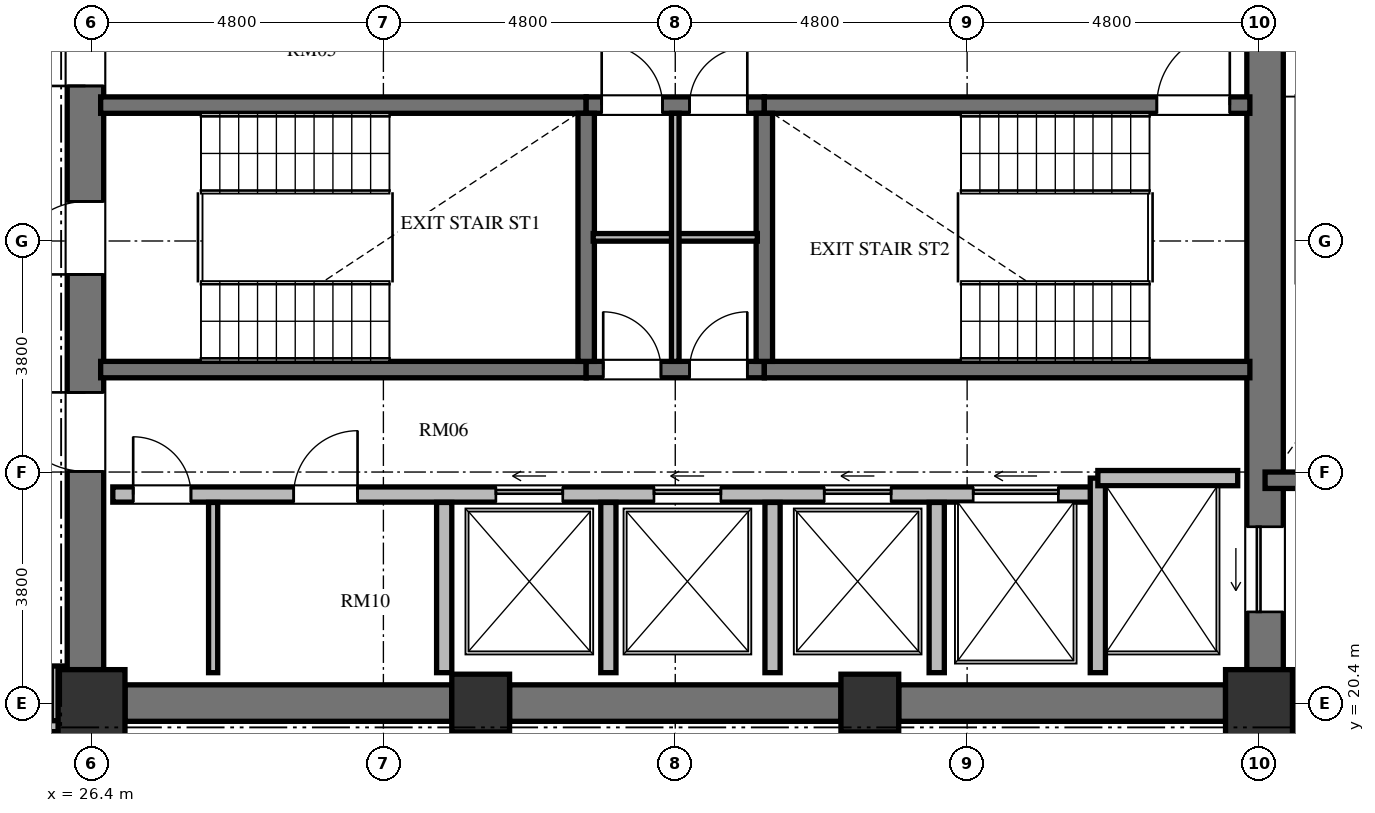
"""IFC4 building model, lengths in metres.
Left out: names, types, materials, properties, quantities, classifications, styles, units other than length and angle.
Written with IfcOpenShell. Run it as: python <this file> out.ifc"""

import sys

from ifc_helpers import new_model, si_unit, direction, frame, frame_2d, origin, origin_2d, place, context, subcontext, project, spatial, rectangle, extrude, element, fill, save


model = new_model("IFC4")
c1 = context("Model", 3, precision=1e-05, world=origin(), true_north=direction((0.0, 1.0)))
c2 = subcontext(c1, "Body", "Model", "MODEL_VIEW")
j1 = project(units=[si_unit("LENGTHUNIT", "METRE"), si_unit("PLANEANGLEUNIT", "RADIAN")], contexts=[c1])
p1 = place(None, origin())
s1 = spatial("IfcSite", under=j1, at=p1, CompositionType="ELEMENT")
p2 = place(p1, origin())
s2 = spatial("IfcBuilding", under=s1, at=p2, CompositionType="ELEMENT")
p3 = place(p2, frame((0.0, 0.0, 160.176)))
s3 = spatial("IfcBuildingStorey", under=s2, at=p3, CompositionType="ELEMENT", Elevation=160.176)
p4 = place(p3, frame((26.4, 20.4, 0.0), z_axis=(0.0, 0.0, 1.0), x_axis=(1.0, 0.0, 0.0)))
e1 = element("IfcColumn", 1, at=p4, inside=s3, PredefinedType="COLUMN", context=c2, shape_type="SweptSolid", body=[
    extrude(rectangle(XDim=1.1, YDim=1.1, at=origin_2d()), origin(), (0.0, 0.0, 1.0), 3.648),
])
for number, where, z_axis, x_axis in (
    (2, (32.8, 20.4, 0.0), (0.0, 0.0, 1.0), (1.0, 0.0, 0.0)),
    (3, (39.2, 20.4, 0.0), (0.0, 0.0, 1.0), (1.0, 0.0, 0.0)),
):
    element("IfcColumn", number, at=place(p3, frame(where, z_axis=z_axis, x_axis=x_axis)), inside=s3, PredefinedType="COLUMN", context=c2, shape_type="SweptSolid", body=[
        extrude(rectangle(XDim=0.95, YDim=0.95, at=origin_2d()), origin(), (0.0, 0.0, 1.0), 3.648),
    ])
p5 = place(p3, frame((45.6, 20.4, 0.0), z_axis=(0.0, 0.0, 1.0), x_axis=(1.0, 0.0, 0.0)))
e4 = element("IfcColumn", 4, at=p5, inside=s3, PredefinedType="COLUMN", context=c2, shape_type="SweptSolid", body=[
    extrude(rectangle(XDim=1.1, YDim=1.1, at=origin_2d()), origin(), (0.0, 0.0, 1.0), 3.648),
])
p6 = place(p3, frame((26.3, 20.95, 0.0), z_axis=(0.0, 0.0, 1.0), x_axis=(0.0, 1.0, 0.0)))
e5 = element("IfcWall", 5, at=p6, inside=s3, PredefinedType="SHEAR", context=c2, shape_type="SweptSolid", body=[
    extrude(rectangle(XDim=14.1, YDim=0.6, at=frame_2d((7.05, 0.0))), origin(), (0.0, 0.0, 1.0), 3.648),
])
p7 = place(p6, frame((6.5, 0.0, 0.0)))
e6 = element("IfcOpeningElement", 6, at=p7, cuts=e5, PredefinedType="OPENING", context=c2, shape_type="SweptSolid", body=[
    extrude(rectangle(XDim=1.2, YDim=2.15, at=frame_2d((0.6, 1.075))), frame((0.0, 0.31, 0.0), z_axis=(0.0, -1.0, 0.0), x_axis=(1.0, 0.0, 0.0)), (0.0, 0.0, 1.0), 0.62),
])
p8 = place(p6, frame((9.6, 0.0, 0.0)))
e7 = element("IfcOpeningElement", 7, at=p8, cuts=e5, PredefinedType="OPENING", context=c2, shape_type="SweptSolid", body=[
    extrude(rectangle(XDim=1.3, YDim=2.2, at=frame_2d((0.65, 1.1))), frame((0.0, 0.31, 0.0), z_axis=(0.0, -1.0, 0.0), x_axis=(1.0, 0.0, 0.0)), (0.0, 0.0, 1.0), 0.62),
])
p9 = place(p6, frame((3.26, 0.0, 0.0)))
e8 = element("IfcOpeningElement", 8, at=p9, cuts=e5, PredefinedType="OPENING", context=c2, shape_type="SweptSolid", body=[
    extrude(rectangle(XDim=1.3, YDim=2.2, at=frame_2d((0.65, 1.1))), frame((0.0, 0.31, 0.0), z_axis=(0.0, -1.0, 0.0), x_axis=(1.0, 0.0, 0.0)), (0.0, 0.0, 1.0), 0.62),
])
p10 = place(p3, frame((45.7, 20.95, 0.0), z_axis=(0.0, 0.0, 1.0), x_axis=(0.0, 1.0, 0.0)))
e9 = element("IfcWall", 9, at=p10, inside=s3, PredefinedType="SHEAR", context=c2, shape_type="SweptSolid", body=[
    extrude(rectangle(XDim=14.1, YDim=0.6, at=frame_2d((7.05, 0.0))), origin(), (0.0, 0.0, 1.0), 3.648),
])
p11 = place(p10, frame((11.75, 0.0, 0.0)))
e10 = element("IfcOpeningElement", 10, at=p11, cuts=e9, PredefinedType="OPENING", context=c2, shape_type="SweptSolid", body=[
    extrude(rectangle(XDim=1.4, YDim=2.3, at=frame_2d((0.7, 1.15))), frame((0.0, 0.31, 0.0), z_axis=(0.0, -1.0, 0.0), x_axis=(1.0, 0.0, 0.0)), (0.0, 0.0, 1.0), 0.62),
])
p12 = place(p10, frame((0.95, 0.0, 0.0)))
e11 = element("IfcOpeningElement", 11, at=p12, cuts=e9, PredefinedType="OPENING", context=c2, shape_type="SweptSolid", body=[
    extrude(rectangle(XDim=1.4, YDim=2.3, at=frame_2d((0.7, 1.15))), frame((0.0, 0.31, 0.0), z_axis=(0.0, -1.0, 0.0), x_axis=(1.0, 0.0, 0.0)), (0.0, 0.0, 1.0), 0.62),
])
p13 = place(p3, frame((26.95, 20.4, 0.0), z_axis=(0.0, 0.0, 1.0), x_axis=(1.0, 0.0, 0.0)))
e12 = element("IfcWall", 12, at=p13, inside=s3, PredefinedType="SHEAR", context=c2, shape_type="SweptSolid", body=[
    extrude(rectangle(XDim=5.375, YDim=0.6, at=frame_2d((2.688, 0.0))), origin(), (0.0, 0.0, 1.0), 3.648),
])
p14 = place(p3, frame((33.275, 20.4, 0.0), z_axis=(0.0, 0.0, 1.0), x_axis=(1.0, 0.0, 0.0)))
e13 = element("IfcWall", 13, at=p14, inside=s3, PredefinedType="SHEAR", context=c2, shape_type="SweptSolid", body=[
    extrude(rectangle(XDim=5.45, YDim=0.6, at=frame_2d((2.725, 0.0))), origin(), (0.0, 0.0, 1.0), 3.648),
])
p15 = place(p3, frame((39.675, 20.4, 0.0), z_axis=(0.0, 0.0, 1.0), x_axis=(1.0, 0.0, 0.0)))
e14 = element("IfcWall", 14, at=p15, inside=s3, PredefinedType="SHEAR", context=c2, shape_type="SweptSolid", body=[
    extrude(rectangle(XDim=5.375, YDim=0.6, at=frame_2d((2.688, 0.0))), origin(), (0.0, 0.0, 1.0), 3.648),
])
p16 = place(p3, frame((26.55, 30.235, 0.0), z_axis=(0.0, 0.0, 1.0), x_axis=(1.0, 0.0, 0.0)))
e15 = element("IfcWall", 15, at=p16, inside=s3, PredefinedType="SHEAR", context=c2, shape_type="SweptSolid", body=[
    extrude(rectangle(XDim=7.985, YDim=0.27, at=frame_2d((3.992, 0.0))), origin(), (0.0, 0.0, 1.0), 3.648),
])
p17 = place(p3, frame((34.535, 30.235, 0.0), z_axis=(0.0, 0.0, 1.0), x_axis=(1.0, 0.0, 0.0)))
e16 = element("IfcWall", 16, at=p17, inside=s3, PredefinedType="SHEAR", context=c2, shape_type="SweptSolid", body=[
    extrude(rectangle(XDim=2.93, YDim=0.27, at=frame_2d((1.465, 0.0))), origin(), (0.0, 0.0, 1.0), 3.648),
])
p18 = place(p17, frame((0.255, 0.0, 0.0)))
e17 = element("IfcOpeningElement", 17, at=p18, cuts=e16, PredefinedType="OPENING", context=c2, shape_type="SweptSolid", body=[
    extrude(rectangle(XDim=1.0, YDim=2.1, at=frame_2d((0.5, 1.05))), frame((0.0, 0.145, 0.0), z_axis=(0.0, -1.0, 0.0), x_axis=(1.0, 0.0, 0.0)), (0.0, 0.0, 1.0), 0.29),
])
p19 = place(p17, frame((1.7, 0.0, 0.0)))
e18 = element("IfcOpeningElement", 18, at=p19, cuts=e16, PredefinedType="OPENING", context=c2, shape_type="SweptSolid", body=[
    extrude(rectangle(XDim=0.95, YDim=2.1, at=frame_2d((0.475, 1.05))), frame((0.0, 0.145, 0.0), z_axis=(0.0, -1.0, 0.0), x_axis=(1.0, 0.0, 0.0)), (0.0, 0.0, 1.0), 0.29),
])
p20 = place(p3, frame((37.465, 30.235, 0.0), z_axis=(0.0, 0.0, 1.0), x_axis=(1.0, 0.0, 0.0)))
e19 = element("IfcWall", 19, at=p20, inside=s3, PredefinedType="SHEAR", context=c2, shape_type="SweptSolid", body=[
    extrude(rectangle(XDim=7.985, YDim=0.27, at=frame_2d((3.992, 0.0))), origin(), (0.0, 0.0, 1.0), 3.648),
])
p21 = place(p20, frame((6.455, 0.0, 0.0)))
e20 = element("IfcOpeningElement", 20, at=p21, cuts=e19, PredefinedType="OPENING", context=c2, shape_type="SweptSolid", body=[
    extrude(rectangle(XDim=1.2, YDim=2.15, at=frame_2d((0.6, 1.075))), frame((0.0, 0.145, 0.0), z_axis=(0.0, -1.0, 0.0), x_axis=(1.0, 0.0, 0.0)), (0.0, 0.0, 1.0), 0.29),
])
p22 = place(p3, frame((26.55, 25.885, 0.0), z_axis=(0.0, 0.0, 1.0), x_axis=(1.0, 0.0, 0.0)))
e21 = element("IfcWall", 21, at=p22, inside=s3, PredefinedType="SHEAR", context=c2, shape_type="SweptSolid", body=[
    extrude(rectangle(XDim=7.985, YDim=0.27, at=frame_2d((3.992, 0.0))), origin(), (0.0, 0.0, 1.0), 3.648),
])
p23 = place(p3, frame((34.535, 25.885, 0.0), z_axis=(0.0, 0.0, 1.0), x_axis=(1.0, 0.0, 0.0)))
e22 = element("IfcWall", 22, at=p23, inside=s3, PredefinedType="SHEAR", context=c2, shape_type="SweptSolid", body=[
    extrude(rectangle(XDim=2.93, YDim=0.27, at=frame_2d((1.465, 0.0))), origin(), (0.0, 0.0, 1.0), 3.648),
])
p24 = place(p23, frame((0.28, 0.0, 0.0)))
e23 = element("IfcOpeningElement", 23, at=p24, cuts=e22, PredefinedType="OPENING", context=c2, shape_type="SweptSolid", body=[
    extrude(rectangle(XDim=0.95, YDim=2.1, at=frame_2d((0.475, 1.05))), frame((0.0, 0.145, 0.0), z_axis=(0.0, -1.0, 0.0), x_axis=(1.0, 0.0, 0.0)), (0.0, 0.0, 1.0), 0.29),
])
p25 = place(p23, frame((1.7, 0.0, 0.0)))
e24 = element("IfcOpeningElement", 24, at=p25, cuts=e22, PredefinedType="OPENING", context=c2, shape_type="SweptSolid", body=[
    extrude(rectangle(XDim=0.95, YDim=2.1, at=frame_2d((0.475, 1.05))), frame((0.0, 0.145, 0.0), z_axis=(0.0, -1.0, 0.0), x_axis=(1.0, 0.0, 0.0)), (0.0, 0.0, 1.0), 0.29),
])
p26 = place(p3, frame((37.465, 25.885, 0.0), z_axis=(0.0, 0.0, 1.0), x_axis=(1.0, 0.0, 0.0)))
e25 = element("IfcWall", 25, at=p26, inside=s3, PredefinedType="SHEAR", context=c2, shape_type="SweptSolid", body=[
    extrude(rectangle(XDim=7.985, YDim=0.27, at=frame_2d((3.992, 0.0))), origin(), (0.0, 0.0, 1.0), 3.648),
])
for number, where, z_axis, x_axis in (
    (26, (34.535, 26.02, 0.0), (0.0, 0.0, 1.0), (0.0, 1.0, 0.0)),
    (27, (37.465, 26.02, 0.0), (0.0, 0.0, 1.0), (0.0, 1.0, 0.0)),
):
    element("IfcWall", number, at=place(p3, frame(where, z_axis=z_axis, x_axis=x_axis)), inside=s3, PredefinedType="SHEAR", context=c2, shape_type="SweptSolid", body=[
        extrude(rectangle(XDim=4.08, YDim=0.27, at=frame_2d((2.04, 0.0))), origin(), (0.0, 0.0, 1.0), 3.648),
    ])
p27 = place(p3, frame((34.65, 28.06, 0.0), z_axis=(0.0, 0.0, 1.0), x_axis=(1.0, 0.0, 0.0)))
e28 = element("IfcWall", 28, at=p27, inside=s3, PredefinedType="PARTITIONING", context=c2, shape_type="SweptSolid", body=[
    extrude(rectangle(XDim=2.7, YDim=0.125, at=frame_2d((1.35, 0.0))), origin(), (0.0, 0.0, 1.0), 3.428),
])
p28 = place(p3, frame((36.0, 26.02, 0.0), z_axis=(0.0, 0.0, 1.0), x_axis=(0.0, 1.0, 0.0)))
e29 = element("IfcWall", 29, at=p28, inside=s3, PredefinedType="PARTITIONING", context=c2, shape_type="SweptSolid", body=[
    extrude(rectangle(XDim=4.08, YDim=0.125, at=frame_2d((2.04, 0.0))), origin(), (0.0, 0.0, 1.0), 3.428),
])
p29 = place(p3, frame((26.75, 23.83, 0.0), z_axis=(0.0, 0.0, 1.0), x_axis=(1.0, 0.0, 0.0)))
e30 = element("IfcWall", 30, at=p29, inside=s3, PredefinedType="SOLIDWALL", context=c2, shape_type="SweptSolid", body=[
    extrude(rectangle(XDim=16.2, YDim=0.25, at=frame_2d((8.1, 0.0))), origin(), (0.0, 0.0, 1.0), 3.428),
])
p30 = place(p29, frame((0.335, 0.0, 0.0)))
e31 = element("IfcOpeningElement", 31, at=p30, cuts=e30, PredefinedType="OPENING", context=c2, shape_type="SweptSolid", body=[
    extrude(rectangle(XDim=0.95, YDim=2.1, at=frame_2d((0.475, 1.05))), frame((0.0, 0.135, 0.0), z_axis=(0.0, -1.0, 0.0), x_axis=(1.0, 0.0, 0.0)), (0.0, 0.0, 1.0), 0.27),
])
p31 = place(p29, frame((2.975, 0.0, 0.0)))
e32 = element("IfcOpeningElement", 32, at=p31, cuts=e30, PredefinedType="OPENING", context=c2, shape_type="SweptSolid", body=[
    extrude(rectangle(XDim=1.05, YDim=2.15, at=frame_2d((0.525, 1.075))), frame((0.0, 0.135, 0.0), z_axis=(0.0, -1.0, 0.0), x_axis=(1.0, 0.0, 0.0)), (0.0, 0.0, 1.0), 0.27),
])
p32 = place(p29, frame((6.3, 0.0, 0.0)))
e33 = element("IfcOpeningElement", 33, at=p32, cuts=e30, PredefinedType="OPENING", context=c2, shape_type="SweptSolid", body=[
    extrude(rectangle(XDim=1.1, YDim=2.2, at=frame_2d((0.55, 1.1))), frame((0.0, 0.135, 0.0), z_axis=(0.0, -1.0, 0.0), x_axis=(1.0, 0.0, 0.0)), (0.0, 0.0, 1.0), 0.27),
])
p33 = place(p29, frame((8.9, 0.0, 0.0)))
e34 = element("IfcOpeningElement", 34, at=p33, cuts=e30, PredefinedType="OPENING", context=c2, shape_type="SweptSolid", body=[
    extrude(rectangle(XDim=1.1, YDim=2.2, at=frame_2d((0.55, 1.1))), frame((0.0, 0.135, 0.0), z_axis=(0.0, -1.0, 0.0), x_axis=(1.0, 0.0, 0.0)), (0.0, 0.0, 1.0), 0.27),
])
p34 = place(p29, frame((11.7, 0.0, 0.0)))
e35 = element("IfcOpeningElement", 35, at=p34, cuts=e30, PredefinedType="OPENING", context=c2, shape_type="SweptSolid", body=[
    extrude(rectangle(XDim=1.1, YDim=2.2, at=frame_2d((0.55, 1.1))), frame((0.0, 0.135, 0.0), z_axis=(0.0, -1.0, 0.0), x_axis=(1.0, 0.0, 0.0)), (0.0, 0.0, 1.0), 0.27),
])
p35 = place(p29, frame((14.15, 0.0, 0.0)))
e36 = element("IfcOpeningElement", 36, at=p35, cuts=e30, PredefinedType="OPENING", context=c2, shape_type="SweptSolid", body=[
    extrude(rectangle(XDim=1.4, YDim=2.3, at=frame_2d((0.7, 1.15))), frame((0.0, 0.135, 0.0), z_axis=(0.0, -1.0, 0.0), x_axis=(1.0, 0.0, 0.0)), (0.0, 0.0, 1.0), 0.27),
])
p36 = place(p3, frame((42.95, 20.9, 0.0), z_axis=(0.0, 0.0, 1.0), x_axis=(0.0, 1.0, 0.0)))
e37 = element("IfcWall", 37, at=p36, inside=s3, PredefinedType="SOLIDWALL", context=c2, shape_type="SweptSolid", body=[
    extrude(rectangle(XDim=3.2, YDim=0.25, at=frame_2d((1.6, 0.0))), origin(), (0.0, 0.0, 1.0), 3.428),
])
p37 = place(p3, frame((42.95, 24.1, 0.0), z_axis=(0.0, 0.0, 1.0), x_axis=(1.0, 0.0, 0.0)))
e38 = element("IfcWall", 38, at=p37, inside=s3, PredefinedType="SOLIDWALL", context=c2, shape_type="SweptSolid", body=[
    extrude(rectangle(XDim=2.3, YDim=0.25, at=frame_2d((1.15, 0.0))), origin(), (0.0, 0.0, 1.0), 3.428),
])
for number, where, z_axis, x_axis in (
    (39, (32.2, 20.9, 0.0), (0.0, 0.0, 1.0), (0.0, 1.0, 0.0)),
    (40, (34.9, 20.9, 0.0), (0.0, 0.0, 1.0), (0.0, 1.0, 0.0)),
    (41, (37.6, 20.9, 0.0), (0.0, 0.0, 1.0), (0.0, 1.0, 0.0)),
    (42, (40.3, 20.9, 0.0), (0.0, 0.0, 1.0), (0.0, 1.0, 0.0)),
):
    element("IfcWall", number, at=place(p3, frame(where, z_axis=z_axis, x_axis=x_axis)), inside=s3, PredefinedType="SOLIDWALL", context=c2, shape_type="SweptSolid", body=[
        extrude(rectangle(XDim=2.8, YDim=0.25, at=frame_2d((1.4, 0.0))), origin(), (0.0, 0.0, 1.0), 3.428),
    ])
p38 = place(p3, frame((28.4, 20.9, 0.0), z_axis=(0.0, 0.0, 1.0), x_axis=(0.0, 1.0, 0.0)))
e43 = element("IfcWall", 43, at=p38, inside=s3, PredefinedType="PARTITIONING", context=c2, shape_type="SweptSolid", body=[
    extrude(rectangle(XDim=2.8, YDim=0.15, at=frame_2d((1.4, 0.0))), origin(), (0.0, 0.0, 1.0), 3.428),
])
p39 = place(p3, frame((45.7, 24.065, 0.0), z_axis=(0.0, 0.0, 1.0), x_axis=(1.0, 0.0, 0.0)))
e44 = element("IfcWall", 44, at=p39, inside=s3, PredefinedType="SHEAR", context=c2, shape_type="SweptSolid", body=[
    extrude(rectangle(XDim=4.715, YDim=0.27, at=frame_2d((2.357, 0.0))), origin(), (0.0, 0.0, 1.0), 3.648),
])
p40 = place(p3, frame((45.7, 20.02, 0.0), z_axis=(0.0, 0.0, 1.0), x_axis=(1.0, 0.0, 0.0)))
e45 = element("IfcWall", 45, at=p40, inside=s3, PredefinedType="SOLIDWALL", context=c2, shape_type="SweptSolid", body=[
    extrude(rectangle(XDim=4.715, YDim=0.25, at=frame_2d((2.357, 0.0))), origin(), (0.0, 0.0, 1.0), 3.428),
])
p41 = place(p3, frame((25.83, 21.01, 0.0), z_axis=(0.0, 0.0, 1.0), x_axis=(0.0, -1.0, 0.0)))
e46 = element("IfcWall", 46, at=p41, inside=s3, PredefinedType="PARTITIONING", context=c2, shape_type="SweptSolid", body=[
    extrude(rectangle(XDim=1.03, YDim=0.18, at=frame_2d((0.515, 0.0))), origin(), (0.0, 0.0, 1.0), 3.428),
])
p42 = place(p3, frame((25.87, 20.02, 0.0), z_axis=(0.0, 0.0, 1.0), x_axis=(-1.0, 0.0, 0.0)))
e47 = element("IfcWall", 47, at=p42, inside=s3, PredefinedType="PARTITIONING", context=c2, shape_type="SweptSolid", body=[
    extrude(rectangle(XDim=2.56, YDim=0.18, at=frame_2d((1.28, 0.0))), origin(), (0.0, 0.0, 1.0), 3.428),
])
p43 = place(p7, origin())
e48 = element("IfcDoor", 48, at=p43, inside=s3, OperationType="SINGLE_SWING_LEFT", PredefinedType="DOOR", context=c2, shape_type="SweptSolid", body=[
    extrude(rectangle(XDim=1.2, YDim=2.15, at=frame_2d((0.6, 1.075))), frame((0.0, 0.025, 0.0), z_axis=(0.0, -1.0, 0.0), x_axis=(1.0, 0.0, 0.0)), (0.0, 0.0, 1.0), 0.05),
])
fill(e6, e48)
p44 = place(p21, origin())
e49 = element("IfcDoor", 49, at=p44, inside=s3, OperationType="SINGLE_SWING_RIGHT", PredefinedType="DOOR", context=c2, shape_type="SweptSolid", body=[
    extrude(rectangle(XDim=1.2, YDim=2.15, at=frame_2d((0.6, 1.075))), frame((0.0, 0.025, 0.0), z_axis=(0.0, -1.0, 0.0), x_axis=(1.0, 0.0, 0.0)), (0.0, 0.0, 1.0), 0.05),
])
fill(e20, e49)
p45 = place(p24, origin())
e50 = element("IfcDoor", 50, at=p45, inside=s3, OperationType="SINGLE_SWING_LEFT", PredefinedType="DOOR", context=c2, shape_type="SweptSolid", body=[
    extrude(rectangle(XDim=0.95, YDim=2.1, at=frame_2d((0.475, 1.05))), frame((0.0, 0.025, 0.0), z_axis=(0.0, -1.0, 0.0), x_axis=(1.0, 0.0, 0.0)), (0.0, 0.0, 1.0), 0.05),
])
fill(e23, e50)
p46 = place(p25, origin())
e51 = element("IfcDoor", 51, at=p46, inside=s3, OperationType="SINGLE_SWING_RIGHT", PredefinedType="DOOR", context=c2, shape_type="SweptSolid", body=[
    extrude(rectangle(XDim=0.95, YDim=2.1, at=frame_2d((0.475, 1.05))), frame((0.0, 0.025, 0.0), z_axis=(0.0, -1.0, 0.0), x_axis=(1.0, 0.0, 0.0)), (0.0, 0.0, 1.0), 0.05),
])
fill(e24, e51)
p47 = place(p18, origin())
e52 = element("IfcDoor", 52, at=p47, inside=s3, OperationType="SINGLE_SWING_LEFT", PredefinedType="DOOR", context=c2, shape_type="SweptSolid", body=[
    extrude(rectangle(XDim=1.0, YDim=2.1, at=frame_2d((0.5, 1.05))), frame((0.0, 0.025, 0.0), z_axis=(0.0, -1.0, 0.0), x_axis=(1.0, 0.0, 0.0)), (0.0, 0.0, 1.0), 0.05),
])
fill(e17, e52)
p48 = place(p19, origin())
e53 = element("IfcDoor", 53, at=p48, inside=s3, OperationType="SINGLE_SWING_RIGHT", PredefinedType="DOOR", context=c2, shape_type="SweptSolid", body=[
    extrude(rectangle(XDim=0.95, YDim=2.1, at=frame_2d((0.475, 1.05))), frame((0.0, 0.025, 0.0), z_axis=(0.0, -1.0, 0.0), x_axis=(1.0, 0.0, 0.0)), (0.0, 0.0, 1.0), 0.05),
])
fill(e18, e53)
p49 = place(p8, origin())
e54 = element("IfcDoor", 54, at=p49, inside=s3, OperationType="SINGLE_SWING_LEFT", PredefinedType="DOOR", context=c2, shape_type="SweptSolid", body=[
    extrude(rectangle(XDim=1.3, YDim=2.2, at=frame_2d((0.65, 1.1))), frame((0.0, 0.025, 0.0), z_axis=(0.0, -1.0, 0.0), x_axis=(1.0, 0.0, 0.0)), (0.0, 0.0, 1.0), 0.05),
])
fill(e7, e54)
p50 = place(p9, origin())
e55 = element("IfcDoor", 55, at=p50, inside=s3, OperationType="SINGLE_SWING_RIGHT", PredefinedType="DOOR", context=c2, shape_type="SweptSolid", body=[
    extrude(rectangle(XDim=1.3, YDim=2.2, at=frame_2d((0.65, 1.1))), frame((0.0, 0.025, 0.0), z_axis=(0.0, -1.0, 0.0), x_axis=(1.0, 0.0, 0.0)), (0.0, 0.0, 1.0), 0.05),
])
fill(e8, e55)
p51 = place(p30, origin())
e56 = element("IfcDoor", 56, at=p51, inside=s3, OperationType="SINGLE_SWING_LEFT", PredefinedType="DOOR", context=c2, shape_type="SweptSolid", body=[
    extrude(rectangle(XDim=0.95, YDim=2.1, at=frame_2d((0.475, 1.05))), frame((0.0, 0.025, 0.0), z_axis=(0.0, -1.0, 0.0), x_axis=(1.0, 0.0, 0.0)), (0.0, 0.0, 1.0), 0.05),
])
fill(e31, e56)
p52 = place(p31, origin())
e57 = element("IfcDoor", 57, at=p52, inside=s3, OperationType="SINGLE_SWING_RIGHT", PredefinedType="DOOR", context=c2, shape_type="SweptSolid", body=[
    extrude(rectangle(XDim=1.05, YDim=2.15, at=frame_2d((0.525, 1.075))), frame((0.0, 0.025, 0.0), z_axis=(0.0, -1.0, 0.0), x_axis=(1.0, 0.0, 0.0)), (0.0, 0.0, 1.0), 0.05),
])
fill(e32, e57)
p53 = place(p32, origin())
e58 = element("IfcDoor", 58, at=p53, inside=s3, OperationType="SLIDING_TO_LEFT", PredefinedType="DOOR", context=c2, shape_type="SweptSolid", body=[
    extrude(rectangle(XDim=1.1, YDim=2.2, at=frame_2d((0.55, 1.1))), frame((0.0, 0.025, 0.0), z_axis=(0.0, -1.0, 0.0), x_axis=(1.0, 0.0, 0.0)), (0.0, 0.0, 1.0), 0.05),
])
fill(e33, e58)
p54 = place(p33, origin())
e59 = element("IfcDoor", 59, at=p54, inside=s3, OperationType="SLIDING_TO_LEFT", PredefinedType="DOOR", context=c2, shape_type="SweptSolid", body=[
    extrude(rectangle(XDim=1.1, YDim=2.2, at=frame_2d((0.55, 1.1))), frame((0.0, 0.025, 0.0), z_axis=(0.0, -1.0, 0.0), x_axis=(1.0, 0.0, 0.0)), (0.0, 0.0, 1.0), 0.05),
])
fill(e34, e59)
p55 = place(p34, origin())
e60 = element("IfcDoor", 60, at=p55, inside=s3, OperationType="SLIDING_TO_LEFT", PredefinedType="DOOR", context=c2, shape_type="SweptSolid", body=[
    extrude(rectangle(XDim=1.1, YDim=2.2, at=frame_2d((0.55, 1.1))), frame((0.0, 0.025, 0.0), z_axis=(0.0, -1.0, 0.0), x_axis=(1.0, 0.0, 0.0)), (0.0, 0.0, 1.0), 0.05),
])
fill(e35, e60)
p56 = place(p12, origin())
e61 = element("IfcDoor", 61, at=p56, inside=s3, OperationType="SLIDING_TO_LEFT", PredefinedType="DOOR", context=c2, shape_type="SweptSolid", body=[
    extrude(rectangle(XDim=1.4, YDim=2.3, at=frame_2d((0.7, 1.15))), frame((0.0, 0.025, 0.0), z_axis=(0.0, -1.0, 0.0), x_axis=(1.0, 0.0, 0.0)), (0.0, 0.0, 1.0), 0.05),
])
fill(e11, e61)
p57 = place(p35, origin())
e62 = element("IfcDoor", 62, at=p57, inside=s3, OperationType="SLIDING_TO_LEFT", PredefinedType="DOOR", context=c2, shape_type="SweptSolid", body=[
    extrude(rectangle(XDim=1.4, YDim=2.3, at=frame_2d((0.7, 1.15))), frame((0.0, 0.025, 0.0), z_axis=(0.0, -1.0, 0.0), x_axis=(1.0, 0.0, 0.0)), (0.0, 0.0, 1.0), 0.05),
])
fill(e36, e62)
save(model, sys.argv[1])
